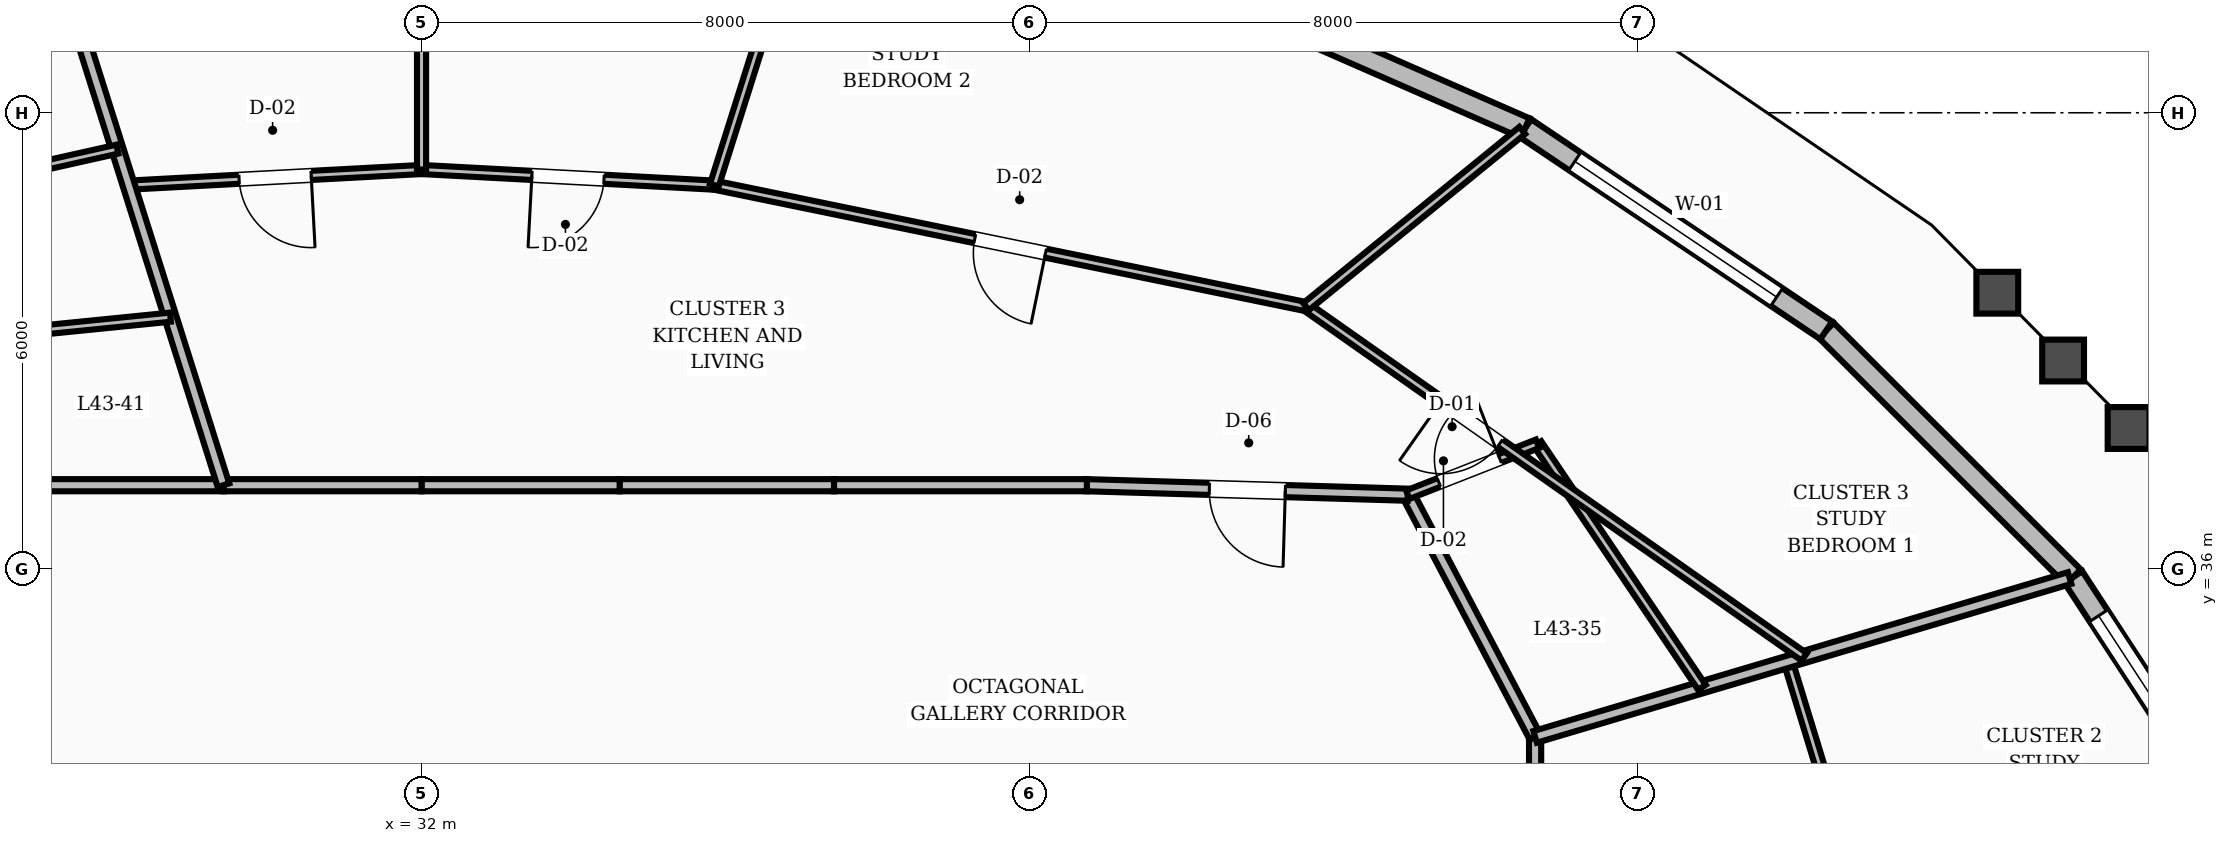
"""IFC4 building model, lengths in metres.
Left out: names, types, materials, properties, quantities, classifications, styles, units other than length and angle.
Written with IfcOpenShell. Run it as: python <this file> out.ifc"""

import sys

from ifc_helpers import new_model, si_unit, direction, frame, frame_2d, origin, place, context, subcontext, project, spatial, rectangle, extrude, element, fill, save


model = new_model("IFC4")
c1 = context("Model", 3, precision=1e-05, world=origin(), true_north=direction((0.0, 1.0)))
c2 = subcontext(c1, "Body", "Model", "MODEL_VIEW")
j1 = project(units=[si_unit("LENGTHUNIT", "METRE"), si_unit("PLANEANGLEUNIT", "RADIAN")], contexts=[c1])
p1 = place(None, origin())
s1 = spatial("IfcSite", under=j1, at=p1, CompositionType="ELEMENT")
p2 = place(p1, origin())
s2 = spatial("IfcBuilding", under=s1, at=p2, CompositionType="ELEMENT")
p3 = place(p2, frame((0.0, 0.0, 167.6)))
s3 = spatial("IfcBuildingStorey", under=s2, at=p3, CompositionType="ELEMENT", Elevation=167.6)
p4 = place(p3, frame((56.146, 32.192, 0.0), z_axis=(0.0, 0.0, 1.0), x_axis=(-0.546488523779, 0.837466592395, 0.0)))
e1 = element("IfcWall", 1, at=p4, inside=s3, PredefinedType="STANDARD", context=c2, shape_type="SweptSolid", body=[
    extrude(rectangle(XDim=4.419, YDim=0.28, at=frame_2d((2.209, 0.0))), origin(), (0.0, 0.0, 1.0), 2.82),
])
p5 = place(p4, frame((0.61, 0.0, 0.8)))
e2 = element("IfcOpeningElement", 2, at=p5, cuts=e1, PredefinedType="OPENING", context=c2, shape_type="SweptSolid", body=[
    extrude(rectangle(XDim=3.2, YDim=1.65, at=frame_2d((1.6, 0.825))), frame((0.0, 0.15, 0.0), z_axis=(0.0, -1.0, 0.0), x_axis=(1.0, 0.0, 0.0)), (0.0, 0.0, 1.0), 0.3),
])
p6 = place(p3, frame((53.731, 35.893, 0.0), z_axis=(0.0, 0.0, 1.0), x_axis=(-0.707797600077, 0.706415286729, 0.0)))
e3 = element("IfcWall", 3, at=p6, inside=s3, PredefinedType="STANDARD", context=c2, shape_type="SweptSolid", body=[
    extrude(rectangle(XDim=4.592, YDim=0.28, at=frame_2d((2.296, 0.0))), origin(), (0.0, 0.0, 1.0), 2.82),
])
p7 = place(p3, frame((50.48, 39.137, 0.0), z_axis=(0.0, 0.0, 1.0), x_axis=(-0.829911180813, 0.557895538575, 0.0)))
e4 = element("IfcWall", 4, at=p7, inside=s3, PredefinedType="STANDARD", context=c2, shape_type="SweptSolid", body=[
    extrude(rectangle(XDim=4.772, YDim=0.28, at=frame_2d((2.386, 0.0))), origin(), (0.0, 0.0, 1.0), 2.82),
])
p8 = place(p7, frame((0.786, 0.0, 0.8)))
e5 = element("IfcOpeningElement", 5, at=p8, cuts=e4, PredefinedType="OPENING", context=c2, shape_type="SweptSolid", body=[
    extrude(rectangle(XDim=3.2, YDim=1.65, at=frame_2d((1.6, 0.825))), frame((0.0, 0.15, 0.0), z_axis=(0.0, -1.0, 0.0), x_axis=(1.0, 0.0, 0.0)), (0.0, 0.0, 1.0), 0.3),
])
p9 = place(p3, frame((46.52, 41.799, 0.0), z_axis=(0.0, 0.0, 1.0), x_axis=(-0.916070979736, 0.401016159381, 0.0)))
e6 = element("IfcWall", 6, at=p9, inside=s3, PredefinedType="STANDARD", context=c2, shape_type="SweptSolid", body=[
    extrude(rectangle(XDim=4.933, YDim=0.28, at=frame_2d((2.466, 0.0))), origin(), (0.0, 0.0, 1.0), 2.82),
])
p10 = place(p3, frame((46.65, 30.068, 0.0), z_axis=(0.0, 0.0, 1.0), x_axis=(0.0, 1.0, 0.0)))
e7 = element("IfcWall", 7, at=p10, inside=s3, PredefinedType="SOLIDWALL", context=c2, shape_type="SweptSolid", body=[
    extrude(rectangle(XDim=3.721, YDim=0.16, at=frame_2d((1.86, 0.0))), origin(), (0.0, 0.0, 1.0), 2.8),
])
p11 = place(p3, frame((46.65, 33.789, 0.0), z_axis=(0.0, 0.0, 1.0), x_axis=(-0.46527115782, 0.885168204185, 0.0)))
e8 = element("IfcWall", 8, at=p11, inside=s3, PredefinedType="SOLIDWALL", context=c2, shape_type="SweptSolid", body=[
    extrude(rectangle(XDim=3.6, YDim=0.16, at=frame_2d((1.8, 0.0))), origin(), (0.0, 0.0, 1.0), 2.8),
])
p12 = place(p3, frame((44.975, 36.975, 0.0), z_axis=(0.0, 0.0, 1.0), x_axis=(-0.999561990195, 0.029594387265, 0.0)))
e9 = element("IfcWall", 9, at=p12, inside=s3, PredefinedType="SOLIDWALL", context=c2, shape_type="SweptSolid", body=[
    extrude(rectangle(XDim=4.224, YDim=0.16, at=frame_2d((2.112, 0.0))), origin(), (0.0, 0.0, 1.0), 2.8),
])
p13 = place(p12, frame((1.612, 0.0, 0.0)))
e10 = element("IfcOpeningElement", 10, at=p13, cuts=e9, PredefinedType="OPENING", context=c2, shape_type="SweptSolid", body=[
    extrude(rectangle(XDim=1.0, YDim=2.1, at=frame_2d((0.5, 1.05))), frame((0.0, 0.09, 0.0), z_axis=(0.0, -1.0, 0.0), x_axis=(1.0, 0.0, 0.0)), (0.0, 0.0, 1.0), 0.18),
])
p14 = place(p3, frame((40.753, 37.1, 0.0), z_axis=(0.0, 0.0, 1.0), x_axis=(-1.0, 0.0, 0.0)))
e11 = element("IfcWall", 11, at=p14, inside=s3, PredefinedType="SOLIDWALL", context=c2, shape_type="SweptSolid", body=[
    extrude(rectangle(XDim=3.327, YDim=0.16, at=frame_2d((1.664, 0.0))), origin(), (0.0, 0.0, 1.0), 2.8),
])
p15 = place(p3, frame((37.426, 37.1, 0.0), z_axis=(0.0, 0.0, 1.0), x_axis=(-1.0, 0.0, 0.0)))
e12 = element("IfcWall", 12, at=p15, inside=s3, PredefinedType="SOLIDWALL", context=c2, shape_type="SweptSolid", body=[
    extrude(rectangle(XDim=2.821, YDim=0.16, at=frame_2d((1.41, 0.0))), origin(), (0.0, 0.0, 1.0), 2.8),
])
for number, where, z_axis, x_axis in (
    (13, (34.606, 37.1, 0.0), (0.0, 0.0, 1.0), (-1.0, 0.0, 0.0)),
    (14, (32.0, 37.1, 0.0), (0.0, 0.0, 1.0), (-1.0, 0.0, 0.0)),
):
    element("IfcWall", number, at=place(p3, frame(where, z_axis=z_axis, x_axis=x_axis)), inside=s3, PredefinedType="SOLIDWALL", context=c2, shape_type="SweptSolid", body=[
        extrude(rectangle(XDim=2.606, YDim=0.16, at=frame_2d((1.303, 0.0))), origin(), (0.0, 0.0, 1.0), 2.8),
    ])
p16 = place(p3, frame((29.394, 37.1, 0.0), z_axis=(0.0, 0.0, 1.0), x_axis=(-1.0, 0.0, 0.0)))
e15 = element("IfcWall", 15, at=p16, inside=s3, PredefinedType="SOLIDWALL", context=c2, shape_type="SweptSolid", body=[
    extrude(rectangle(XDim=2.821, YDim=0.16, at=frame_2d((1.41, 0.0))), origin(), (0.0, 0.0, 1.0), 2.8),
])
p17 = place(p3, frame((51.113, 31.066, 0.0), z_axis=(0.0, 0.0, 1.0), x_axis=(-0.292520584303, 0.956259226235, 0.0)))
e16 = element("IfcWall", 16, at=p17, inside=s3, PredefinedType="PARTITIONING", context=c2, shape_type="SweptSolid", body=[
    extrude(rectangle(XDim=3.881, YDim=0.12, at=frame_2d((1.94, 0.0))), origin(), (0.0, 0.0, 1.0), 2.8),
])
p18 = place(p17, frame((1.466, 0.0, 0.0)))
e17 = element("IfcOpeningElement", 17, at=p18, cuts=e16, PredefinedType="OPENING", context=c2, shape_type="SweptSolid", body=[
    extrude(rectangle(XDim=0.95, YDim=2.1, at=frame_2d((0.475, 1.05))), frame((0.0, 0.07, 0.0), z_axis=(0.0, -1.0, 0.0), x_axis=(1.0, 0.0, 0.0)), (0.0, 0.0, 1.0), 0.14),
])
p19 = place(p3, frame((46.65, 33.789, 0.0), z_axis=(0.0, 0.0, 1.0), x_axis=(0.95857221619, 0.284849620586, 0.0)))
e18 = element("IfcWall", 18, at=p19, inside=s3, PredefinedType="SOLIDWALL", context=c2, shape_type="SweptSolid", body=[
    extrude(rectangle(XDim=7.337, YDim=0.16, at=frame_2d((3.668, 0.0))), origin(), (0.0, 0.0, 1.0), 2.8),
])
p20 = place(p3, frame((48.845, 34.441, 0.0), z_axis=(0.0, 0.0, 1.0), x_axis=(-0.559572632914, 0.828781315242, 0.0)))
e19 = element("IfcWall", 19, at=p20, inside=s3, PredefinedType="PARTITIONING", context=c2, shape_type="SweptSolid", body=[
    extrude(rectangle(XDim=3.866, YDim=0.12, at=frame_2d((1.933, 0.0))), origin(), (0.0, 0.0, 1.0), 2.8),
])
p21 = place(p3, frame((44.975, 36.975, 0.0), z_axis=(0.0, 0.0, 1.0), x_axis=(0.930800041421, 0.365528771631, 0.0)))
e20 = element("IfcWall", 20, at=p21, inside=s3, PredefinedType="PARTITIONING", context=c2, shape_type="SweptSolid", body=[
    extrude(rectangle(XDim=1.833, YDim=0.12, at=frame_2d((0.917, 0.0))), origin(), (0.0, 0.0, 1.0), 2.8),
])
p22 = place(p21, frame((0.44, 0.0, 0.0)))
e21 = element("IfcOpeningElement", 21, at=p22, cuts=e20, PredefinedType="OPENING", context=c2, shape_type="SweptSolid", body=[
    extrude(rectangle(XDim=0.86, YDim=2.1, at=frame_2d((0.43, 1.05))), frame((0.0, 0.07, 0.0), z_axis=(0.0, -1.0, 0.0), x_axis=(1.0, 0.0, 0.0)), (0.0, 0.0, 1.0), 0.14),
])
p23 = place(p3, frame((50.19, 34.841, 0.0), z_axis=(0.0, 0.0, 1.0), x_axis=(-0.81799600151, 0.575223905547, 0.0)))
e22 = element("IfcWall", 22, at=p23, inside=s3, PredefinedType="PARTITIONING", context=c2, shape_type="SweptSolid", body=[
    extrude(rectangle(XDim=8.012, YDim=0.12, at=frame_2d((4.006, 0.0))), origin(), (0.0, 0.0, 1.0), 2.8),
])
p24 = place(p23, frame((4.891, 0.0, 0.0)))
e23 = element("IfcOpeningElement", 23, at=p24, cuts=e22, PredefinedType="OPENING", context=c2, shape_type="SweptSolid", body=[
    extrude(rectangle(XDim=0.95, YDim=2.1, at=frame_2d((0.475, 1.05))), frame((0.0, 0.07, 0.0), z_axis=(0.0, -1.0, 0.0), x_axis=(1.0, 0.0, 0.0)), (0.0, 0.0, 1.0), 0.14),
])
p25 = place(p3, frame((43.636, 39.449, 0.0), z_axis=(0.0, 0.0, 1.0), x_axis=(-0.979568261135, 0.201111963285, 0.0)))
e24 = element("IfcWall", 24, at=p25, inside=s3, PredefinedType="PARTITIONING", context=c2, shape_type="SweptSolid", body=[
    extrude(rectangle(XDim=7.947, YDim=0.12, at=frame_2d((3.973, 0.0))), origin(), (0.0, 0.0, 1.0), 2.8),
])
p26 = place(p25, frame((3.498, 0.0, 0.0)))
e25 = element("IfcOpeningElement", 25, at=p26, cuts=e24, PredefinedType="OPENING", context=c2, shape_type="SweptSolid", body=[
    extrude(rectangle(XDim=0.95, YDim=2.1, at=frame_2d((0.475, 1.05))), frame((0.0, 0.07, 0.0), z_axis=(0.0, -1.0, 0.0), x_axis=(1.0, 0.0, 0.0)), (0.0, 0.0, 1.0), 0.14),
])
p27 = place(p3, frame((43.636, 39.449, 0.0), z_axis=(0.0, 0.0, 1.0), x_axis=(0.775242225658, 0.631664065431, 0.0)))
e26 = element("IfcWall", 26, at=p27, inside=s3, PredefinedType="PARTITIONING", context=c2, shape_type="SweptSolid", body=[
    extrude(rectangle(XDim=3.669, YDim=0.12, at=frame_2d((1.835, 0.0))), origin(), (0.0, 0.0, 1.0), 2.8),
])
p28 = place(p3, frame((35.852, 41.048, 0.0), z_axis=(0.0, 0.0, 1.0), x_axis=(-0.998575909079, 0.053349356192, 0.0)))
e27 = element("IfcWall", 27, at=p28, inside=s3, PredefinedType="PARTITIONING", context=c2, shape_type="SweptSolid", body=[
    extrude(rectangle(XDim=3.858, YDim=0.12, at=frame_2d((1.929, 0.0))), origin(), (0.0, 0.0, 1.0), 2.8),
])
p29 = place(p28, frame((1.454, 0.0, 0.0)))
e28 = element("IfcOpeningElement", 28, at=p29, cuts=e27, PredefinedType="OPENING", context=c2, shape_type="SweptSolid", body=[
    extrude(rectangle(XDim=0.95, YDim=2.1, at=frame_2d((0.475, 1.05))), frame((0.0, 0.07, 0.0), z_axis=(0.0, -1.0, 0.0), x_axis=(1.0, 0.0, 0.0)), (0.0, 0.0, 1.0), 0.14),
])
p30 = place(p3, frame((35.852, 41.048, 0.0), z_axis=(0.0, 0.0, 1.0), x_axis=(0.301037088962, 0.953612432317, 0.0)))
e29 = element("IfcWall", 29, at=p30, inside=s3, PredefinedType="PARTITIONING", context=c2, shape_type="SweptSolid", body=[
    extrude(rectangle(XDim=4.09, YDim=0.12, at=frame_2d((2.045, 0.0))), origin(), (0.0, 0.0, 1.0), 2.8),
])
p31 = place(p3, frame((32.0, 41.253, 0.0), z_axis=(0.0, 0.0, 1.0), x_axis=(-0.998575909079, -0.053349356192, 0.0)))
e30 = element("IfcWall", 30, at=p31, inside=s3, PredefinedType="PARTITIONING", context=c2, shape_type="SweptSolid", body=[
    extrude(rectangle(XDim=3.858, YDim=0.12, at=frame_2d((1.929, 0.0))), origin(), (0.0, 0.0, 1.0), 2.8),
])
p32 = place(p31, frame((1.454, 0.0, 0.0)))
e31 = element("IfcOpeningElement", 31, at=p32, cuts=e30, PredefinedType="OPENING", context=c2, shape_type="SweptSolid", body=[
    extrude(rectangle(XDim=0.95, YDim=2.1, at=frame_2d((0.475, 1.05))), frame((0.0, 0.07, 0.0), z_axis=(0.0, -1.0, 0.0), x_axis=(1.0, 0.0, 0.0)), (0.0, 0.0, 1.0), 0.14),
])
p33 = place(p3, frame((32.0, 41.253, 0.0), z_axis=(0.0, 0.0, 1.0), x_axis=(0.0, 1.0, 0.0)))
e32 = element("IfcWall", 32, at=p33, inside=s3, PredefinedType="PARTITIONING", context=c2, shape_type="SweptSolid", body=[
    extrude(rectangle(XDim=4.103, YDim=0.12, at=frame_2d((2.052, 0.0))), origin(), (0.0, 0.0, 1.0), 2.8),
])
p34 = place(p3, frame((29.394, 37.1, 0.0), z_axis=(0.0, 0.0, 1.0), x_axis=(-0.301084514056, 0.953597459831, 0.0)))
e33 = element("IfcWall", 33, at=p34, inside=s3, PredefinedType="SOLIDWALL", context=c2, shape_type="SweptSolid", body=[
    extrude(rectangle(XDim=8.229, YDim=0.16, at=frame_2d((4.115, 0.0))), origin(), (0.0, 0.0, 1.0), 2.8),
])
p35 = place(p3, frame((28.696, 39.311, 0.0), z_axis=(0.0, 0.0, 1.0), x_axis=(-0.995009592211, -0.099779313529, 0.0)))
e34 = element("IfcWall", 34, at=p35, inside=s3, PredefinedType="PARTITIONING", context=c2, shape_type="SweptSolid", body=[
    extrude(rectangle(XDim=3.421, YDim=0.12, at=frame_2d((1.71, 0.0))), origin(), (0.0, 0.0, 1.0), 2.8),
])
p36 = place(p3, frame((27.998, 41.521, 0.0), z_axis=(0.0, 0.0, 1.0), x_axis=(-0.975756725435, -0.218857973964, 0.0)))
e35 = element("IfcWall", 35, at=p36, inside=s3, PredefinedType="PARTITIONING", context=c2, shape_type="SweptSolid", body=[
    extrude(rectangle(XDim=8.179, YDim=0.12, at=frame_2d((4.089, 0.0))), origin(), (0.0, 0.0, 1.0), 2.8),
])
p37 = place(p36, frame((5.011, 0.0, 0.0)))
e36 = element("IfcOpeningElement", 36, at=p37, cuts=e35, PredefinedType="OPENING", context=c2, shape_type="SweptSolid", body=[
    extrude(rectangle(XDim=0.95, YDim=2.1, at=frame_2d((0.475, 1.05))), frame((0.0, 0.07, 0.0), z_axis=(0.0, -1.0, 0.0), x_axis=(1.0, 0.0, 0.0)), (0.0, 0.0, 1.0), 0.14),
])
p38 = place(p5, origin())
e37 = element("IfcWindow", 37, at=p38, inside=s3, PartitioningType="SINGLE_PANEL", PredefinedType="WINDOW", context=c2, shape_type="SweptSolid", body=[
    extrude(rectangle(XDim=3.2, YDim=1.65, at=frame_2d((1.6, 0.825))), frame((0.0, 0.03, 0.0), z_axis=(0.0, -1.0, 0.0), x_axis=(1.0, 0.0, 0.0)), (0.0, 0.0, 1.0), 0.06),
])
fill(e2, e37)
p39 = place(p8, origin())
e38 = element("IfcWindow", 38, at=p39, inside=s3, PartitioningType="SINGLE_PANEL", PredefinedType="WINDOW", context=c2, shape_type="SweptSolid", body=[
    extrude(rectangle(XDim=3.2, YDim=1.65, at=frame_2d((1.6, 0.825))), frame((0.0, 0.03, 0.0), z_axis=(0.0, -1.0, 0.0), x_axis=(1.0, 0.0, 0.0)), (0.0, 0.0, 1.0), 0.06),
])
fill(e5, e38)
p40 = place(p22, origin())
e39 = element("IfcDoor", 39, at=p40, inside=s3, OperationType="SINGLE_SWING_RIGHT", PredefinedType="DOOR", context=c2, shape_type="SweptSolid", body=[
    extrude(rectangle(XDim=0.86, YDim=2.1, at=frame_2d((0.43, 1.05))), frame((0.0, 0.025, 0.0), z_axis=(0.0, -1.0, 0.0), x_axis=(1.0, 0.0, 0.0)), (0.0, 0.0, 1.0), 0.05),
])
fill(e21, e39)
p41 = place(p13, origin())
e40 = element("IfcDoor", 40, at=p41, inside=s3, OperationType="SINGLE_SWING_LEFT", PredefinedType="DOOR", context=c2, shape_type="SweptSolid", body=[
    extrude(rectangle(XDim=1.0, YDim=2.1, at=frame_2d((0.5, 1.05))), frame((0.0, 0.025, 0.0), z_axis=(0.0, -1.0, 0.0), x_axis=(1.0, 0.0, 0.0)), (0.0, 0.0, 1.0), 0.05),
])
fill(e10, e40)
p42 = place(p24, origin())
e41 = element("IfcDoor", 41, at=p42, inside=s3, OperationType="SINGLE_SWING_RIGHT", PredefinedType="DOOR", context=c2, shape_type="SweptSolid", body=[
    extrude(rectangle(XDim=0.95, YDim=2.1, at=frame_2d((0.475, 1.05))), frame((0.0, 0.025, 0.0), z_axis=(0.0, -1.0, 0.0), x_axis=(1.0, 0.0, 0.0)), (0.0, 0.0, 1.0), 0.05),
])
fill(e23, e41)
p43 = place(p26, origin())
e42 = element("IfcDoor", 42, at=p43, inside=s3, OperationType="SINGLE_SWING_LEFT", PredefinedType="DOOR", context=c2, shape_type="SweptSolid", body=[
    extrude(rectangle(XDim=0.95, YDim=2.1, at=frame_2d((0.475, 1.05))), frame((0.0, 0.025, 0.0), z_axis=(0.0, -1.0, 0.0), x_axis=(1.0, 0.0, 0.0)), (0.0, 0.0, 1.0), 0.05),
])
fill(e25, e42)
p44 = place(p29, origin())
e43 = element("IfcDoor", 43, at=p44, inside=s3, OperationType="SINGLE_SWING_RIGHT", PredefinedType="DOOR", context=c2, shape_type="SweptSolid", body=[
    extrude(rectangle(XDim=0.95, YDim=2.1, at=frame_2d((0.475, 1.05))), frame((0.0, 0.025, 0.0), z_axis=(0.0, -1.0, 0.0), x_axis=(1.0, 0.0, 0.0)), (0.0, 0.0, 1.0), 0.05),
])
fill(e28, e43)
p45 = place(p32, origin())
e44 = element("IfcDoor", 44, at=p45, inside=s3, OperationType="SINGLE_SWING_LEFT", PredefinedType="DOOR", context=c2, shape_type="SweptSolid", body=[
    extrude(rectangle(XDim=0.95, YDim=2.1, at=frame_2d((0.475, 1.05))), frame((0.0, 0.025, 0.0), z_axis=(0.0, -1.0, 0.0), x_axis=(1.0, 0.0, 0.0)), (0.0, 0.0, 1.0), 0.05),
])
fill(e31, e44)
save(model, sys.argv[1])
